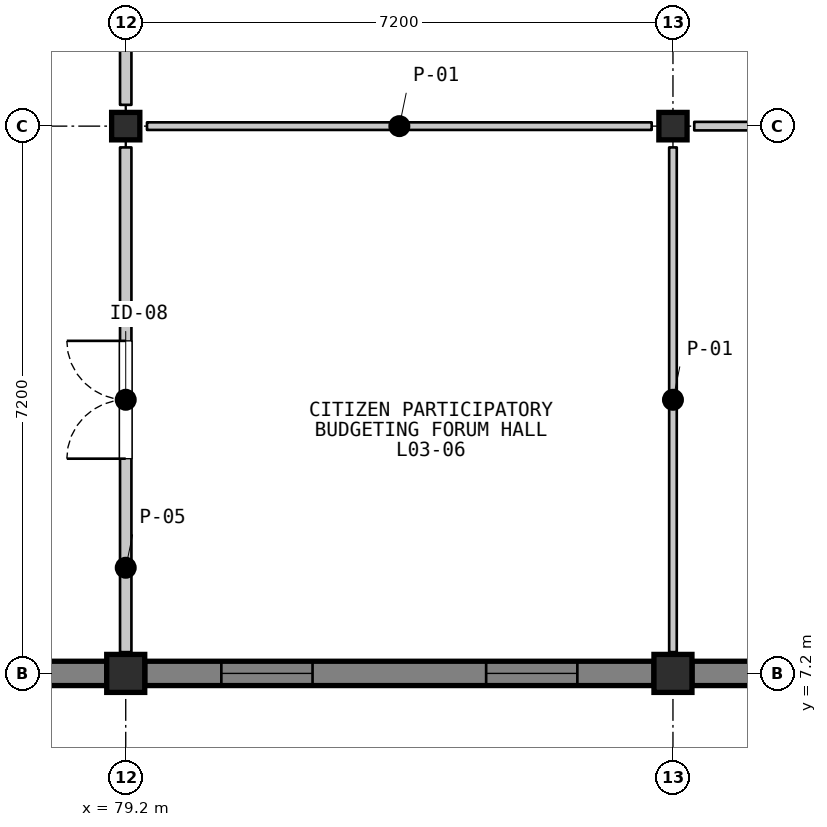
"""IFC4 building model, lengths in metres.
Left out: names, types, materials, properties, quantities, classifications, styles, units other than length and angle.
Written with IfcOpenShell. Run it as: python <this file> out.ifc"""

import sys

from ifc_helpers import new_model, si_unit, direction, frame, frame_2d, origin, origin_2d, place, context, subcontext, project, spatial, rectangle, i_section, extrude, element, fill, save


model = new_model("IFC4")
c1 = context("Model", 3, precision=1e-05, world=origin(), true_north=direction((0.0, 1.0)))
c2 = subcontext(c1, "Body", "Model", "MODEL_VIEW")
j1 = project(units=[si_unit("LENGTHUNIT", "METRE"), si_unit("PLANEANGLEUNIT", "RADIAN")], contexts=[c1])
p1 = place(None, origin())
s1 = spatial("IfcSite", under=j1, at=p1, CompositionType="ELEMENT")
p2 = place(p1, origin())
s2 = spatial("IfcBuilding", under=s1, at=p2, CompositionType="ELEMENT")
p3 = place(p2, frame((0.0, 0.0, 9.9)))
s3 = spatial("IfcBuildingStorey", under=s2, at=p3, CompositionType="ELEMENT", Elevation=9.9)
p4 = place(p3, frame((79.2, 7.2, 0.0), z_axis=(0.0, 0.0, 1.0), x_axis=(1.0, 0.0, 0.0)))
e1 = element("IfcColumn", 1, at=p4, inside=s3, PredefinedType="COLUMN", context=c2, shape_type="SweptSolid", body=[
    extrude(rectangle(XDim=0.5, YDim=0.5, at=origin_2d()), origin(), (0.0, 0.0, 1.0), 4.2),
])
p5 = place(p3, frame((79.2, 14.4, 0.0), z_axis=(0.0, 0.0, 1.0), x_axis=(1.0, 0.0, 0.0)))
e2 = element("IfcColumn", 2, at=p5, inside=s3, PredefinedType="COLUMN", context=c2, shape_type="SweptSolid", body=[
    extrude(i_section(OverallWidth=0.371, OverallDepth=0.361, WebThickness=0.012, FlangeThickness=0.02, FilletRadius=0.015, at=origin_2d()), origin(), (0.0, 0.0, 1.0), 4.2),
])
p6 = place(p3, frame((86.4, 7.2, 0.0), z_axis=(0.0, 0.0, 1.0), x_axis=(1.0, 0.0, 0.0)))
e3 = element("IfcColumn", 3, at=p6, inside=s3, PredefinedType="COLUMN", context=c2, shape_type="SweptSolid", body=[
    extrude(rectangle(XDim=0.5, YDim=0.5, at=origin_2d()), origin(), (0.0, 0.0, 1.0), 4.2),
])
p7 = place(p3, frame((86.4, 14.4, 0.0), z_axis=(0.0, 0.0, 1.0), x_axis=(1.0, 0.0, 0.0)))
e4 = element("IfcColumn", 4, at=p7, inside=s3, PredefinedType="COLUMN", context=c2, shape_type="SweptSolid", body=[
    extrude(i_section(OverallWidth=0.371, OverallDepth=0.361, WebThickness=0.012, FlangeThickness=0.02, FilletRadius=0.015, at=origin_2d()), origin(), (0.0, 0.0, 1.0), 4.2),
])
p8 = place(p3, frame((78.95, 7.2, 0.0), z_axis=(0.0, 0.0, 1.0), x_axis=(-1.0, 0.0, 0.0)))
e5 = element("IfcWall", 5, at=p8, inside=s3, PredefinedType="SOLIDWALL", context=c2, shape_type="SweptSolid", body=[
    extrude(rectangle(XDim=6.7, YDim=0.32, at=frame_2d((3.35, 0.0))), origin(), (0.0, 0.0, 1.0), 3.418),
])
p9 = place(p8, frame((1.008, 0.0, 0.95)))
e6 = element("IfcOpeningElement", 6, at=p9, cuts=e5, PredefinedType="OPENING", context=c2, shape_type="SweptSolid", body=[
    extrude(rectangle(XDim=1.2, YDim=1.7, at=frame_2d((0.6, 0.85))), frame((0.0, 0.17, 0.0), z_axis=(0.0, -1.0, 0.0), x_axis=(1.0, 0.0, 0.0)), (0.0, 0.0, 1.0), 0.34),
])
p10 = place(p8, frame((4.492, 0.0, 0.95)))
e7 = element("IfcOpeningElement", 7, at=p10, cuts=e5, PredefinedType="OPENING", context=c2, shape_type="SweptSolid", body=[
    extrude(rectangle(XDim=1.2, YDim=1.7, at=frame_2d((0.6, 0.85))), frame((0.0, 0.17, 0.0), z_axis=(0.0, -1.0, 0.0), x_axis=(1.0, 0.0, 0.0)), (0.0, 0.0, 1.0), 0.34),
])
p11 = place(p3, frame((86.15, 7.2, 0.0), z_axis=(0.0, 0.0, 1.0), x_axis=(-1.0, 0.0, 0.0)))
e8 = element("IfcWall", 8, at=p11, inside=s3, PredefinedType="SOLIDWALL", context=c2, shape_type="SweptSolid", body=[
    extrude(rectangle(XDim=6.7, YDim=0.32, at=frame_2d((3.35, 0.0))), origin(), (0.0, 0.0, 1.0), 3.418),
])
p12 = place(p11, frame((1.008, 0.0, 0.95)))
e9 = element("IfcOpeningElement", 9, at=p12, cuts=e8, PredefinedType="OPENING", context=c2, shape_type="SweptSolid", body=[
    extrude(rectangle(XDim=1.2, YDim=1.7, at=frame_2d((0.6, 0.85))), frame((0.0, 0.17, 0.0), z_axis=(0.0, -1.0, 0.0), x_axis=(1.0, 0.0, 0.0)), (0.0, 0.0, 1.0), 0.34),
])
p13 = place(p11, frame((4.492, 0.0, 0.95)))
e10 = element("IfcOpeningElement", 10, at=p13, cuts=e8, PredefinedType="OPENING", context=c2, shape_type="SweptSolid", body=[
    extrude(rectangle(XDim=1.2, YDim=1.7, at=frame_2d((0.6, 0.85))), frame((0.0, 0.17, 0.0), z_axis=(0.0, -1.0, 0.0), x_axis=(1.0, 0.0, 0.0)), (0.0, 0.0, 1.0), 0.34),
])
p14 = place(p3, frame((93.35, 7.2, 0.0), z_axis=(0.0, 0.0, 1.0), x_axis=(-1.0, 0.0, 0.0)))
e11 = element("IfcWall", 11, at=p14, inside=s3, PredefinedType="SOLIDWALL", context=c2, shape_type="SweptSolid", body=[
    extrude(rectangle(XDim=6.7, YDim=0.32, at=frame_2d((3.35, 0.0))), origin(), (0.0, 0.0, 1.0), 3.418),
])
p15 = place(p14, frame((1.008, 0.0, 0.95)))
e12 = element("IfcOpeningElement", 12, at=p15, cuts=e11, PredefinedType="OPENING", context=c2, shape_type="SweptSolid", body=[
    extrude(rectangle(XDim=1.2, YDim=1.7, at=frame_2d((0.6, 0.85))), frame((0.0, 0.17, 0.0), z_axis=(0.0, -1.0, 0.0), x_axis=(1.0, 0.0, 0.0)), (0.0, 0.0, 1.0), 0.34),
])
p16 = place(p14, frame((4.492, 0.0, 0.95)))
e13 = element("IfcOpeningElement", 13, at=p16, cuts=e11, PredefinedType="OPENING", context=c2, shape_type="SweptSolid", body=[
    extrude(rectangle(XDim=1.2, YDim=1.7, at=frame_2d((0.6, 0.85))), frame((0.0, 0.17, 0.0), z_axis=(0.0, -1.0, 0.0), x_axis=(1.0, 0.0, 0.0)), (0.0, 0.0, 1.0), 0.34),
])
p17 = place(p3, frame((79.2, 7.48, 0.0), z_axis=(0.0, 0.0, 1.0), x_axis=(0.0, 1.0, 0.0)))
e14 = element("IfcWall", 14, at=p17, inside=s3, PredefinedType="PARTITIONING", context=c2, shape_type="SweptSolid", body=[
    extrude(rectangle(XDim=6.64, YDim=0.15, at=frame_2d((3.32, 0.0))), origin(), (0.0, 0.0, 1.0), 3.477),
])
p18 = place(p17, frame((2.545, 0.0, 0.0)))
e15 = element("IfcOpeningElement", 15, at=p18, cuts=e14, PredefinedType="OPENING", context=c2, shape_type="SweptSolid", body=[
    extrude(rectangle(XDim=1.55, YDim=2.3, at=frame_2d((0.775, 1.15))), frame((0.0, 0.085, 0.0), z_axis=(0.0, -1.0, 0.0), x_axis=(1.0, 0.0, 0.0)), (0.0, 0.0, 1.0), 0.17),
])
p19 = place(p3, frame((79.48, 14.4, 0.0), z_axis=(0.0, 0.0, 1.0), x_axis=(1.0, 0.0, 0.0)))
e16 = element("IfcWall", 16, at=p19, inside=s3, PredefinedType="PARTITIONING", context=c2, shape_type="SweptSolid", body=[
    extrude(rectangle(XDim=6.64, YDim=0.1, at=frame_2d((3.32, 0.0))), origin(), (0.0, 0.0, 1.0), 3.408),
])
p20 = place(p3, frame((86.4, 14.12, 0.0), z_axis=(0.0, 0.0, 1.0), x_axis=(0.0, -1.0, 0.0)))
e17 = element("IfcWall", 17, at=p20, inside=s3, PredefinedType="PARTITIONING", context=c2, shape_type="SweptSolid", body=[
    extrude(rectangle(XDim=6.64, YDim=0.1, at=frame_2d((3.32, 0.0))), origin(), (0.0, 0.0, 1.0), 3.477),
])
p21 = place(p3, frame((79.2, 14.68, 0.0), z_axis=(0.0, 0.0, 1.0), x_axis=(0.0, 1.0, 0.0)))
e18 = element("IfcWall", 18, at=p21, inside=s3, PredefinedType="PARTITIONING", context=c2, shape_type="SweptSolid", body=[
    extrude(rectangle(XDim=6.64, YDim=0.15, at=frame_2d((3.32, 0.0))), origin(), (0.0, 0.0, 1.0), 3.477),
])
p22 = place(p21, frame((2.545, 0.0, 0.0)))
e19 = element("IfcOpeningElement", 19, at=p22, cuts=e18, PredefinedType="OPENING", context=c2, shape_type="SweptSolid", body=[
    extrude(rectangle(XDim=1.55, YDim=2.3, at=frame_2d((0.775, 1.15))), frame((0.0, 0.085, 0.0), z_axis=(0.0, -1.0, 0.0), x_axis=(1.0, 0.0, 0.0)), (0.0, 0.0, 1.0), 0.17),
])
p23 = place(p3, frame((93.32, 14.4, 0.0), z_axis=(0.0, 0.0, 1.0), x_axis=(-1.0, 0.0, 0.0)))
e20 = element("IfcWall", 20, at=p23, inside=s3, PredefinedType="PARTITIONING", context=c2, shape_type="SweptSolid", body=[
    extrude(rectangle(XDim=6.64, YDim=0.112, at=frame_2d((3.32, 0.0))), origin(), (0.0, 0.0, 1.0), 3.408),
])
p24 = place(p12, origin())
e21 = element("IfcWindow", 21, at=p24, inside=s3, PartitioningType="SINGLE_PANEL", PredefinedType="WINDOW", context=c2, shape_type="SweptSolid", body=[
    extrude(rectangle(XDim=1.2, YDim=1.7, at=frame_2d((0.6, 0.85))), frame((0.0, 0.03, 0.0), z_axis=(0.0, -1.0, 0.0), x_axis=(1.0, 0.0, 0.0)), (0.0, 0.0, 1.0), 0.06),
])
fill(e9, e21)
p25 = place(p13, origin())
e22 = element("IfcWindow", 22, at=p25, inside=s3, PartitioningType="SINGLE_PANEL", PredefinedType="WINDOW", context=c2, shape_type="SweptSolid", body=[
    extrude(rectangle(XDim=1.2, YDim=1.7, at=frame_2d((0.6, 0.85))), frame((0.0, 0.03, 0.0), z_axis=(0.0, -1.0, 0.0), x_axis=(1.0, 0.0, 0.0)), (0.0, 0.0, 1.0), 0.06),
])
fill(e10, e22)
p26 = place(p18, origin())
e23 = element("IfcDoor", 23, at=p26, inside=s3, OperationType="DOUBLE_DOOR_SINGLE_SWING", PredefinedType="DOOR", context=c2, shape_type="SweptSolid", body=[
    extrude(rectangle(XDim=1.55, YDim=2.3, at=frame_2d((0.775, 1.15))), frame((0.0, 0.025, 0.0), z_axis=(0.0, -1.0, 0.0), x_axis=(1.0, 0.0, 0.0)), (0.0, 0.0, 1.0), 0.05),
])
fill(e15, e23)
save(model, sys.argv[1])
